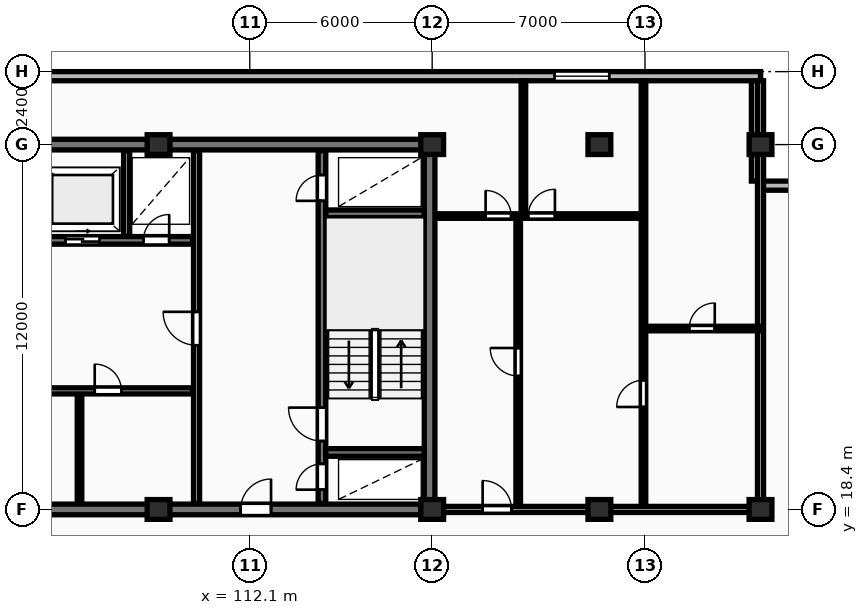
"""IFC4 building model, lengths in metres.
Left out: names, types, materials, properties, quantities, classifications, styles, units other than length and angle.
Written with IfcOpenShell. Run it as: python <this file> out.ifc"""

import sys

from ifc_helpers import new_model, si_unit, direction, frame, frame_2d, origin, origin_2d, place, context, subcontext, project, spatial, rectangle, extrude, element, fill, save


model = new_model("IFC4")
c1 = context("Model", 3, precision=1e-05, world=origin(), true_north=direction((0.0, 1.0)))
c2 = subcontext(c1, "Body", "Model", "MODEL_VIEW")
j1 = project(units=[si_unit("LENGTHUNIT", "METRE"), si_unit("PLANEANGLEUNIT", "RADIAN")], contexts=[c1])
p1 = place(None, origin())
s1 = spatial("IfcSite", under=j1, at=p1, CompositionType="ELEMENT")
p2 = place(p1, origin())
s2 = spatial("IfcBuilding", under=s1, at=p2, CompositionType="ELEMENT")
p3 = place(p2, frame((0.0, 0.0, 201.1)))
s3 = spatial("IfcBuildingStorey", under=s2, at=p3, CompositionType="ELEMENT", Elevation=201.1)
for number, where, z_axis, x_axis in (
    (1, (109.1, 18.4, 0.0), (0.0, 0.0, 1.0), (1.0, 0.0, 0.0)),
    (2, (109.1, 30.4, 0.0), (0.0, 0.0, 1.0), (1.0, 0.0, 0.0)),
    (3, (118.1, 18.4, 0.0), (0.0, 0.0, 1.0), (1.0, 0.0, 0.0)),
    (4, (118.1, 30.4, 0.0), (0.0, 0.0, 1.0), (1.0, 0.0, 0.0)),
    (5, (123.6, 18.4, 0.0), (0.0, 0.0, 1.0), (1.0, 0.0, 0.0)),
    (6, (123.6, 30.4, 0.0), (0.0, 0.0, 1.0), (1.0, 0.0, 0.0)),
    (7, (128.9, 18.4, 0.0), (0.0, 0.0, 1.0), (1.0, 0.0, 0.0)),
    (8, (128.9, 30.4, 0.0), (0.0, 0.0, 1.0), (1.0, 0.0, 0.0)),
):
    element("IfcColumn", number, at=place(p3, frame(where, z_axis=z_axis, x_axis=x_axis)), inside=s3, PredefinedType="COLUMN", context=c2, shape_type="SweptSolid", body=[
        extrude(rectangle(XDim=0.75, YDim=0.65, at=origin_2d()), origin(), (0.0, 0.0, 1.0), 3.25),
    ])
p4 = place(p3, frame((132.5, 29.05, 0.0), z_axis=(0.0, 0.0, 1.0), x_axis=(-1.0, 0.0, 0.0)))
e9 = element("IfcWall", 9, at=p4, inside=s3, PredefinedType="STANDARD", context=c2, shape_type="SweptSolid", body=[
    extrude(rectangle(XDim=3.6, YDim=0.3, at=frame_2d((1.8, 0.0))), origin(), (0.0, 0.0, 1.0), 2.97),
])
p5 = place(p3, frame((128.75, 29.2, 0.0), z_axis=(0.0, 0.0, 1.0), x_axis=(0.0, 1.0, 0.0)))
e10 = element("IfcWall", 10, at=p5, inside=s3, PredefinedType="STANDARD", context=c2, shape_type="SweptSolid", body=[
    extrude(rectangle(XDim=3.6, YDim=0.3, at=frame_2d((1.8, 0.0))), origin(), (0.0, 0.0, 1.0), 2.2),
])
p6 = place(p3, frame((128.9, 32.65, 0.0), z_axis=(0.0, 0.0, 1.0), x_axis=(-1.0, 0.0, 0.0)))
e11 = element("IfcWall", 11, at=p6, inside=s3, PredefinedType="STANDARD", context=c2, shape_type="SweptSolid", body=[
    extrude(rectangle(XDim=54.4, YDim=0.3, at=frame_2d((27.2, 0.0))), origin(), (0.0, 0.0, 1.0), 2.97),
])
p7 = place(p6, frame((48.65, 0.0, 0.85)))
e12 = element("IfcOpeningElement", 12, at=p7, cuts=e11, PredefinedType="OPENING", context=c2, shape_type="SweptSolid", body=[
    extrude(rectangle(XDim=1.8, YDim=1.8, at=frame_2d((0.9, 0.9))), frame((0.0, 0.16, 0.0), z_axis=(0.0, -1.0, 0.0), x_axis=(1.0, 0.0, 0.0)), (0.0, 0.0, 1.0), 0.32),
])
p8 = place(p6, frame((4.975, 0.0, 0.85)))
e13 = element("IfcOpeningElement", 13, at=p8, cuts=e11, PredefinedType="OPENING", context=c2, shape_type="SweptSolid", body=[
    extrude(rectangle(XDim=1.8, YDim=1.8, at=frame_2d((0.9, 0.9))), frame((0.0, 0.16, 0.0), z_axis=(0.0, -1.0, 0.0), x_axis=(1.0, 0.0, 0.0)), (0.0, 0.0, 1.0), 0.32),
])
p9 = place(p3, frame((81.925, 30.4, 0.0), z_axis=(0.0, 0.0, 1.0), x_axis=(1.0, 0.0, 0.0)))
e14 = element("IfcWall", 14, at=p9, inside=s3, PredefinedType="SHEAR", context=c2, shape_type="SweptSolid", body=[
    extrude(rectangle(XDim=36.265, YDim=0.35, at=frame_2d((18.132, 0.0))), origin(), (0.0, 0.0, 1.0), 3.25),
])
p10 = place(p3, frame((118.015, 18.575, 0.0), z_axis=(0.0, 0.0, 1.0), x_axis=(0.0, 1.0, 0.0)))
e15 = element("IfcWall", 15, at=p10, inside=s3, PredefinedType="SHEAR", context=c2, shape_type="SweptSolid", body=[
    extrude(rectangle(XDim=11.65, YDim=0.35, at=frame_2d((5.825, 0.0))), origin(), (0.0, 0.0, 1.0), 3.25),
])
p11 = place(p3, frame((81.925, 18.4, 0.0), z_axis=(0.0, 0.0, 1.0), x_axis=(1.0, 0.0, 0.0)))
e16 = element("IfcWall", 16, at=p11, inside=s3, PredefinedType="SHEAR", context=c2, shape_type="SweptSolid", body=[
    extrude(rectangle(XDim=36.265, YDim=0.35, at=frame_2d((18.132, 0.0))), origin(), (0.0, 0.0, 1.0), 3.25),
])
p12 = place(p11, frame((5.675, 0.0, 0.0)))
e17 = element("IfcOpeningElement", 17, at=p12, cuts=e16, PredefinedType="OPENING", context=c2, shape_type="SweptSolid", body=[
    extrude(rectangle(XDim=1.0, YDim=2.15, at=frame_2d((0.5, 1.075))), frame((0.0, 0.185, 0.0), z_axis=(0.0, -1.0, 0.0), x_axis=(1.0, 0.0, 0.0)), (0.0, 0.0, 1.0), 0.37),
])
p13 = place(p11, frame((21.925, 0.0, 0.0)))
e18 = element("IfcOpeningElement", 18, at=p13, cuts=e16, PredefinedType="OPENING", context=c2, shape_type="SweptSolid", body=[
    extrude(rectangle(XDim=1.5, YDim=2.2, at=frame_2d((0.75, 1.1))), frame((0.0, 0.185, 0.0), z_axis=(0.0, -1.0, 0.0), x_axis=(1.0, 0.0, 0.0)), (0.0, 0.0, 1.0), 0.37),
])
p14 = place(p11, frame((29.875, 0.0, 0.0)))
e19 = element("IfcOpeningElement", 19, at=p14, cuts=e16, PredefinedType="OPENING", context=c2, shape_type="SweptSolid", body=[
    extrude(rectangle(XDim=1.0, YDim=2.15, at=frame_2d((0.5, 1.075))), frame((0.0, 0.185, 0.0), z_axis=(0.0, -1.0, 0.0), x_axis=(1.0, 0.0, 0.0)), (0.0, 0.0, 1.0), 0.37),
])
p15 = place(p3, frame((108.05, 27.38, 0.0), z_axis=(0.0, 0.0, 1.0), x_axis=(0.0, 1.0, 0.0)))
e20 = element("IfcWall", 20, at=p15, inside=s3, PredefinedType="PARTITIONING", context=c2, shape_type="SweptSolid", body=[
    extrude(rectangle(XDim=2.82, YDim=0.2, at=frame_2d((1.41, 0.0))), origin(), (0.0, 0.0, 1.0), 2.97),
])
p16 = place(p3, frame((99.68, 27.25, 0.0), z_axis=(0.0, 0.0, 1.0), x_axis=(1.0, 0.0, 0.0)))
e21 = element("IfcWall", 21, at=p16, inside=s3, PredefinedType="SHEAR", context=c2, shape_type="SweptSolid", body=[
    extrude(rectangle(XDim=10.54, YDim=0.25, at=frame_2d((5.27, 0.0))), origin(), (0.0, 0.0, 1.0), 3.25),
])
p17 = place(p16, frame((0.76, 0.0, 0.0)))
e22 = element("IfcOpeningElement", 22, at=p17, cuts=e21, PredefinedType="OPENING", context=c2, shape_type="SweptSolid", body=[
    extrude(rectangle(XDim=1.12, YDim=2.12, at=frame_2d((0.56, 1.06))), frame((0.0, 0.135, 0.0), z_axis=(0.0, -1.0, 0.0), x_axis=(1.0, 0.0, 0.0)), (0.0, 0.0, 1.0), 0.27),
])
p18 = place(p16, frame((3.56, 0.0, 0.0)))
e23 = element("IfcOpeningElement", 23, at=p18, cuts=e21, PredefinedType="OPENING", context=c2, shape_type="SweptSolid", body=[
    extrude(rectangle(XDim=1.12, YDim=2.12, at=frame_2d((0.56, 1.06))), frame((0.0, 0.135, 0.0), z_axis=(0.0, -1.0, 0.0), x_axis=(1.0, 0.0, 0.0)), (0.0, 0.0, 1.0), 0.27),
])
p19 = place(p16, frame((6.36, 0.0, 0.0)))
e24 = element("IfcOpeningElement", 24, at=p19, cuts=e21, PredefinedType="OPENING", context=c2, shape_type="SweptSolid", body=[
    extrude(rectangle(XDim=1.12, YDim=2.12, at=frame_2d((0.56, 1.06))), frame((0.0, 0.135, 0.0), z_axis=(0.0, -1.0, 0.0), x_axis=(1.0, 0.0, 0.0)), (0.0, 0.0, 1.0), 0.27),
])
p20 = place(p16, frame((8.92, 0.0, 0.0)))
e25 = element("IfcOpeningElement", 25, at=p20, cuts=e21, PredefinedType="OPENING", context=c2, shape_type="SweptSolid", body=[
    extrude(rectangle(XDim=0.85, YDim=2.05, at=frame_2d((0.425, 1.025))), frame((0.0, 0.135, 0.0), z_axis=(0.0, -1.0, 0.0), x_axis=(1.0, 0.0, 0.0)), (0.0, 0.0, 1.0), 0.27),
])
p21 = place(p3, frame((106.5, 18.6, 0.0), z_axis=(0.0, 0.0, 1.0), x_axis=(0.0, 1.0, 0.0)))
e26 = element("IfcWall", 26, at=p21, inside=s3, PredefinedType="PARTITIONING", context=c2, shape_type="SweptSolid", body=[
    extrude(rectangle(XDim=3.6, YDim=0.15, at=frame_2d((1.8, 0.0))), origin(), (0.0, 0.0, 1.0), 2.97),
])
p22 = place(p3, frame((91.08, 22.3, 0.0), z_axis=(0.0, 0.0, 1.0), x_axis=(1.0, 0.0, 0.0)))
e27 = element("IfcWall", 27, at=p22, inside=s3, PredefinedType="PARTITIONING", context=c2, shape_type="SweptSolid", body=[
    extrude(rectangle(XDim=19.14, YDim=0.2, at=frame_2d((9.57, 0.0))), origin(), (0.0, 0.0, 1.0), 2.97),
])
p23 = place(p22, frame((1.15, 0.0, 0.0)))
e28 = element("IfcOpeningElement", 28, at=p23, cuts=e27, PredefinedType="OPENING", context=c2, shape_type="SweptSolid", body=[
    extrude(rectangle(XDim=0.85, YDim=2.05, at=frame_2d((0.425, 1.025))), frame((0.0, 0.11, 0.0), z_axis=(0.0, -1.0, 0.0), x_axis=(1.0, 0.0, 0.0)), (0.0, 0.0, 1.0), 0.22),
])
p24 = place(p22, frame((3.2, 0.0, 0.0)))
e29 = element("IfcOpeningElement", 29, at=p24, cuts=e27, PredefinedType="OPENING", context=c2, shape_type="SweptSolid", body=[
    extrude(rectangle(XDim=0.85, YDim=2.05, at=frame_2d((0.425, 1.025))), frame((0.0, 0.11, 0.0), z_axis=(0.0, -1.0, 0.0), x_axis=(1.0, 0.0, 0.0)), (0.0, 0.0, 1.0), 0.22),
])
p25 = place(p22, frame((12.72, 0.0, 0.0)))
e30 = element("IfcOpeningElement", 30, at=p25, cuts=e27, PredefinedType="OPENING", context=c2, shape_type="SweptSolid", body=[
    extrude(rectangle(XDim=1.5, YDim=2.2, at=frame_2d((0.75, 1.1))), frame((0.0, 0.11, 0.0), z_axis=(0.0, -1.0, 0.0), x_axis=(1.0, 0.0, 0.0)), (0.0, 0.0, 1.0), 0.22),
])
p26 = place(p22, frame((6.42, 0.0, 0.0)))
e31 = element("IfcOpeningElement", 31, at=p26, cuts=e27, PredefinedType="OPENING", context=c2, shape_type="SweptSolid", body=[
    extrude(rectangle(XDim=0.92, YDim=2.08, at=frame_2d((0.46, 1.04))), frame((0.0, 0.11, 0.0), z_axis=(0.0, -1.0, 0.0), x_axis=(1.0, 0.0, 0.0)), (0.0, 0.0, 1.0), 0.22),
])
p27 = place(p22, frame((15.92, 0.0, 0.0)))
e32 = element("IfcOpeningElement", 32, at=p27, cuts=e27, PredefinedType="OPENING", context=c2, shape_type="SweptSolid", body=[
    extrude(rectangle(XDim=0.88, YDim=2.06, at=frame_2d((0.44, 1.03))), frame((0.0, 0.11, 0.0), z_axis=(0.0, -1.0, 0.0), x_axis=(1.0, 0.0, 0.0)), (0.0, 0.0, 1.0), 0.22),
])
p28 = place(p3, frame((110.35, 18.6, 0.0), z_axis=(0.0, 0.0, 1.0), x_axis=(0.0, 1.0, 0.0)))
e33 = element("IfcWall", 33, at=p28, inside=s3, PredefinedType="PARTITIONING", context=c2, shape_type="SweptSolid", body=[
    extrude(rectangle(XDim=11.6, YDim=0.2, at=frame_2d((5.8, 0.0))), origin(), (0.0, 0.0, 1.0), 2.97),
])
p29 = place(p28, frame((5.2, 0.0, 0.0)))
e34 = element("IfcOpeningElement", 34, at=p29, cuts=e33, PredefinedType="OPENING", context=c2, shape_type="SweptSolid", body=[
    extrude(rectangle(XDim=1.1, YDim=2.15, at=frame_2d((0.55, 1.075))), frame((0.0, 0.11, 0.0), z_axis=(0.0, -1.0, 0.0), x_axis=(1.0, 0.0, 0.0)), (0.0, 0.0, 1.0), 0.22),
])
p30 = place(p3, frame((114.475, 18.6, 0.0), z_axis=(0.0, 0.0, 1.0), x_axis=(0.0, 1.0, 0.0)))
e35 = element("IfcWall", 35, at=p30, inside=s3, PredefinedType="SHEAR", context=c2, shape_type="SweptSolid", body=[
    extrude(rectangle(XDim=11.6, YDim=0.25, at=frame_2d((5.8, 0.0))), origin(), (0.0, 0.0, 1.0), 3.25),
])
p31 = place(p30, frame((0.45, 0.0, 0.0)))
e36 = element("IfcOpeningElement", 36, at=p31, cuts=e35, PredefinedType="OPENING", context=c2, shape_type="SweptSolid", body=[
    extrude(rectangle(XDim=0.85, YDim=2.05, at=frame_2d((0.425, 1.025))), frame((0.0, 0.135, 0.0), z_axis=(0.0, -1.0, 0.0), x_axis=(1.0, 0.0, 0.0)), (0.0, 0.0, 1.0), 0.27),
])
p32 = place(p30, frame((2.05, 0.0, 0.0)))
e37 = element("IfcOpeningElement", 37, at=p32, cuts=e35, PredefinedType="OPENING", context=c2, shape_type="SweptSolid", body=[
    extrude(rectangle(XDim=1.1, YDim=2.1, at=frame_2d((0.55, 1.05))), frame((0.0, 0.135, 0.0), z_axis=(0.0, -1.0, 0.0), x_axis=(1.0, 0.0, 0.0)), (0.0, 0.0, 1.0), 0.27),
])
p33 = place(p30, frame((9.95, 0.0, 0.0)))
e38 = element("IfcOpeningElement", 38, at=p33, cuts=e35, PredefinedType="OPENING", context=c2, shape_type="SweptSolid", body=[
    extrude(rectangle(XDim=0.85, YDim=2.05, at=frame_2d((0.425, 1.025))), frame((0.0, 0.135, 0.0), z_axis=(0.0, -1.0, 0.0), x_axis=(1.0, 0.0, 0.0)), (0.0, 0.0, 1.0), 0.27),
])
for number, where, z_axis, x_axis in (
    (39, (114.6, 20.275, 0.0), (0.0, 0.0, 1.0), (1.0, 0.0, 0.0)),
    (40, (114.6, 28.125, 0.0), (0.0, 0.0, 1.0), (1.0, 0.0, 0.0)),
):
    element("IfcWall", number, at=place(p3, frame(where, z_axis=z_axis, x_axis=x_axis)), inside=s3, PredefinedType="SHEAR", context=c2, shape_type="SweptSolid", body=[
        extrude(rectangle(XDim=3.24, YDim=0.25, at=frame_2d((1.62, 0.0))), origin(), (0.0, 0.0, 1.0), 3.25),
    ])
p34 = place(p3, frame((128.9, 18.4, 0.0), z_axis=(0.0, 0.0, 1.0), x_axis=(0.0, 1.0, 0.0)))
e41 = element("IfcWall", 41, at=p34, inside=s3, PredefinedType="PARTITIONING", context=c2, shape_type="SweptSolid", body=[
    extrude(rectangle(XDim=14.1, YDim=0.2, at=frame_2d((7.05, 0.0))), origin(), (0.0, 0.0, 1.0), 2.2),
])
p35 = place(p3, frame((125.05, 24.35, 0.0), z_axis=(0.0, 0.0, 1.0), x_axis=(1.0, 0.0, 0.0)))
e42 = element("IfcWall", 42, at=p35, inside=s3, PredefinedType="PARTITIONING", context=c2, shape_type="SweptSolid", body=[
    extrude(rectangle(XDim=3.85, YDim=0.15, at=frame_2d((1.925, 0.0))), origin(), (0.0, 0.0, 1.0), 2.97),
])
p36 = place(p35, frame((1.505, 0.0, 0.0)))
e43 = element("IfcOpeningElement", 43, at=p36, cuts=e42, PredefinedType="OPENING", context=c2, shape_type="SweptSolid", body=[
    extrude(rectangle(XDim=0.84, YDim=2.04, at=frame_2d((0.42, 1.02))), frame((0.0, 0.085, 0.0), z_axis=(0.0, -1.0, 0.0), x_axis=(1.0, 0.0, 0.0)), (0.0, 0.0, 1.0), 0.17),
])
p37 = place(p3, frame((125.05, 18.45, 0.0), z_axis=(0.0, 0.0, 1.0), x_axis=(0.0, 1.0, 0.0)))
e44 = element("IfcWall", 44, at=p37, inside=s3, PredefinedType="PARTITIONING", context=c2, shape_type="SweptSolid", body=[
    extrude(rectangle(XDim=14.05, YDim=0.15, at=frame_2d((7.025, 0.0))), origin(), (0.0, 0.0, 1.0), 2.97),
])
p38 = place(p37, frame((3.32, 0.0, 0.0)))
e45 = element("IfcOpeningElement", 45, at=p38, cuts=e44, PredefinedType="OPENING", context=c2, shape_type="SweptSolid", body=[
    extrude(rectangle(XDim=0.88, YDim=2.06, at=frame_2d((0.44, 1.03))), frame((0.0, 0.085, 0.0), z_axis=(0.0, -1.0, 0.0), x_axis=(1.0, 0.0, 0.0)), (0.0, 0.0, 1.0), 0.17),
])
p39 = place(p3, frame((120.93, 18.45, 0.0), z_axis=(0.0, 0.0, 1.0), x_axis=(0.0, 1.0, 0.0)))
e46 = element("IfcWall", 46, at=p39, inside=s3, PredefinedType="PARTITIONING", context=c2, shape_type="SweptSolid", body=[
    extrude(rectangle(XDim=9.6, YDim=0.15, at=frame_2d((4.8, 0.0))), origin(), (0.0, 0.0, 1.0), 2.97),
])
p40 = place(p39, frame((4.34, 0.0, 0.0)))
e47 = element("IfcOpeningElement", 47, at=p40, cuts=e46, PredefinedType="OPENING", context=c2, shape_type="SweptSolid", body=[
    extrude(rectangle(XDim=0.92, YDim=2.08, at=frame_2d((0.46, 1.04))), frame((0.0, 0.085, 0.0), z_axis=(0.0, -1.0, 0.0), x_axis=(1.0, 0.0, 0.0)), (0.0, 0.0, 1.0), 0.17),
])
p41 = place(p3, frame((121.1, 28.05, 0.0), z_axis=(0.0, 0.0, 1.0), x_axis=(0.0, 1.0, 0.0)))
e48 = element("IfcWall", 48, at=p41, inside=s3, PredefinedType="PARTITIONING", context=c2, shape_type="SweptSolid", body=[
    extrude(rectangle(XDim=4.45, YDim=0.15, at=frame_2d((2.225, 0.0))), origin(), (0.0, 0.0, 1.0), 2.97),
])
p42 = place(p3, frame((118.27, 28.05, 0.0), z_axis=(0.0, 0.0, 1.0), x_axis=(1.0, 0.0, 0.0)))
e49 = element("IfcWall", 49, at=p42, inside=s3, PredefinedType="PARTITIONING", context=c2, shape_type="SweptSolid", body=[
    extrude(rectangle(XDim=6.76, YDim=0.15, at=frame_2d((3.38, 0.0))), origin(), (0.0, 0.0, 1.0), 2.97),
])
p43 = place(p42, frame((1.587, 0.0, 0.0)))
e50 = element("IfcOpeningElement", 50, at=p43, cuts=e49, PredefinedType="OPENING", context=c2, shape_type="SweptSolid", body=[
    extrude(rectangle(XDim=0.84, YDim=2.04, at=frame_2d((0.42, 1.02))), frame((0.0, 0.085, 0.0), z_axis=(0.0, -1.0, 0.0), x_axis=(1.0, 0.0, 0.0)), (0.0, 0.0, 1.0), 0.17),
])
p44 = place(p42, frame((2.988, 0.0, 0.0)))
e51 = element("IfcOpeningElement", 51, at=p44, cuts=e49, PredefinedType="OPENING", context=c2, shape_type="SweptSolid", body=[
    extrude(rectangle(XDim=0.88, YDim=2.06, at=frame_2d((0.44, 1.03))), frame((0.0, 0.085, 0.0), z_axis=(0.0, -1.0, 0.0), x_axis=(1.0, 0.0, 0.0)), (0.0, 0.0, 1.0), 0.17),
])
p45 = place(p3, frame((118.25, 18.4, 0.0), z_axis=(0.0, 0.0, 1.0), x_axis=(1.0, 0.0, 0.0)))
e52 = element("IfcWall", 52, at=p45, inside=s3, PredefinedType="PARTITIONING", context=c2, shape_type="SweptSolid", body=[
    extrude(rectangle(XDim=10.65, YDim=0.2, at=frame_2d((5.325, 0.0))), origin(), (0.0, 0.0, 1.0), 2.358),
])
p46 = place(p45, frame((1.51, 0.0, 0.0)))
e53 = element("IfcOpeningElement", 53, at=p46, cuts=e52, PredefinedType="OPENING", context=c2, shape_type="SweptSolid", body=[
    extrude(rectangle(XDim=0.95, YDim=2.15, at=frame_2d((0.475, 1.075))), frame((0.0, 0.11, 0.0), z_axis=(0.0, -1.0, 0.0), x_axis=(1.0, 0.0, 0.0)), (0.0, 0.0, 1.0), 0.22),
])
p47 = place(p8, origin())
e54 = element("IfcWindow", 54, at=p47, inside=s3, PartitioningType="SINGLE_PANEL", PredefinedType="WINDOW", context=c2, shape_type="SweptSolid", body=[
    extrude(rectangle(XDim=1.8, YDim=1.8, at=frame_2d((0.9, 0.9))), frame((0.0, 0.03, 0.0), z_axis=(0.0, -1.0, 0.0), x_axis=(1.0, 0.0, 0.0)), (0.0, 0.0, 1.0), 0.06),
])
fill(e13, e54)
p48 = place(p14, origin())
e55 = element("IfcDoor", 55, at=p48, inside=s3, OperationType="SINGLE_SWING_RIGHT", PredefinedType="DOOR", context=c2, shape_type="SweptSolid", body=[
    extrude(rectangle(XDim=1.0, YDim=2.15, at=frame_2d((0.5, 1.075))), frame((0.0, 0.025, 0.0), z_axis=(0.0, -1.0, 0.0), x_axis=(1.0, 0.0, 0.0)), (0.0, 0.0, 1.0), 0.05),
])
fill(e19, e55)
p49 = place(p19, origin())
e56 = element("IfcDoor", 56, at=p49, inside=s3, OperationType="SLIDING_TO_RIGHT", PredefinedType="DOOR", context=c2, shape_type="SweptSolid", body=[
    extrude(rectangle(XDim=1.12, YDim=2.12, at=frame_2d((0.56, 1.06))), frame((0.0, 0.025, 0.0), z_axis=(0.0, -1.0, 0.0), x_axis=(1.0, 0.0, 0.0)), (0.0, 0.0, 1.0), 0.05),
])
fill(e24, e56)
p50 = place(p20, origin())
e57 = element("IfcDoor", 57, at=p50, inside=s3, OperationType="SINGLE_SWING_RIGHT", PredefinedType="DOOR", context=c2, shape_type="SweptSolid", body=[
    extrude(rectangle(XDim=0.85, YDim=2.05, at=frame_2d((0.425, 1.025))), frame((0.0, 0.025, 0.0), z_axis=(0.0, -1.0, 0.0), x_axis=(1.0, 0.0, 0.0)), (0.0, 0.0, 1.0), 0.05),
])
fill(e25, e57)
p51 = place(p27, origin())
e58 = element("IfcDoor", 58, at=p51, inside=s3, OperationType="SINGLE_SWING_LEFT", PredefinedType="DOOR", context=c2, shape_type="SweptSolid", body=[
    extrude(rectangle(XDim=0.88, YDim=2.06, at=frame_2d((0.44, 1.03))), frame((0.0, 0.025, 0.0), z_axis=(0.0, -1.0, 0.0), x_axis=(1.0, 0.0, 0.0)), (0.0, 0.0, 1.0), 0.05),
])
fill(e32, e58)
p52 = place(p29, origin())
e59 = element("IfcDoor", 59, at=p52, inside=s3, OperationType="SINGLE_SWING_RIGHT", PredefinedType="DOOR", context=c2, shape_type="SweptSolid", body=[
    extrude(rectangle(XDim=1.1, YDim=2.15, at=frame_2d((0.55, 1.075))), frame((0.0, 0.025, 0.0), z_axis=(0.0, -1.0, 0.0), x_axis=(1.0, 0.0, 0.0)), (0.0, 0.0, 1.0), 0.05),
])
fill(e34, e59)
p53 = place(p31, origin())
e60 = element("IfcDoor", 60, at=p53, inside=s3, OperationType="SINGLE_SWING_LEFT", PredefinedType="DOOR", context=c2, shape_type="SweptSolid", body=[
    extrude(rectangle(XDim=0.85, YDim=2.05, at=frame_2d((0.425, 1.025))), frame((0.0, 0.025, 0.0), z_axis=(0.0, -1.0, 0.0), x_axis=(1.0, 0.0, 0.0)), (0.0, 0.0, 1.0), 0.05),
])
fill(e36, e60)
p54 = place(p32, origin())
e61 = element("IfcDoor", 61, at=p54, inside=s3, OperationType="SINGLE_SWING_RIGHT", PredefinedType="DOOR", context=c2, shape_type="SweptSolid", body=[
    extrude(rectangle(XDim=1.1, YDim=2.1, at=frame_2d((0.55, 1.05))), frame((0.0, 0.025, 0.0), z_axis=(0.0, -1.0, 0.0), x_axis=(1.0, 0.0, 0.0)), (0.0, 0.0, 1.0), 0.05),
])
fill(e37, e61)
p55 = place(p33, origin())
e62 = element("IfcDoor", 62, at=p55, inside=s3, OperationType="SINGLE_SWING_LEFT", PredefinedType="DOOR", context=c2, shape_type="SweptSolid", body=[
    extrude(rectangle(XDim=0.85, YDim=2.05, at=frame_2d((0.425, 1.025))), frame((0.0, 0.025, 0.0), z_axis=(0.0, -1.0, 0.0), x_axis=(1.0, 0.0, 0.0)), (0.0, 0.0, 1.0), 0.05),
])
fill(e38, e62)
p56 = place(p36, origin())
e63 = element("IfcDoor", 63, at=p56, inside=s3, OperationType="SINGLE_SWING_RIGHT", PredefinedType="DOOR", context=c2, shape_type="SweptSolid", body=[
    extrude(rectangle(XDim=0.84, YDim=2.04, at=frame_2d((0.42, 1.02))), frame((0.0, 0.025, 0.0), z_axis=(0.0, -1.0, 0.0), x_axis=(1.0, 0.0, 0.0)), (0.0, 0.0, 1.0), 0.05),
])
fill(e43, e63)
p57 = place(p38, origin())
e64 = element("IfcDoor", 64, at=p57, inside=s3, OperationType="SINGLE_SWING_LEFT", PredefinedType="DOOR", context=c2, shape_type="SweptSolid", body=[
    extrude(rectangle(XDim=0.88, YDim=2.06, at=frame_2d((0.44, 1.03))), frame((0.0, 0.025, 0.0), z_axis=(0.0, -1.0, 0.0), x_axis=(1.0, 0.0, 0.0)), (0.0, 0.0, 1.0), 0.05),
])
fill(e45, e64)
p58 = place(p40, origin())
e65 = element("IfcDoor", 65, at=p58, inside=s3, OperationType="SINGLE_SWING_RIGHT", PredefinedType="DOOR", context=c2, shape_type="SweptSolid", body=[
    extrude(rectangle(XDim=0.92, YDim=2.08, at=frame_2d((0.46, 1.04))), frame((0.0, 0.025, 0.0), z_axis=(0.0, -1.0, 0.0), x_axis=(1.0, 0.0, 0.0)), (0.0, 0.0, 1.0), 0.05),
])
fill(e47, e65)
p59 = place(p43, origin())
e66 = element("IfcDoor", 66, at=p59, inside=s3, OperationType="SINGLE_SWING_LEFT", PredefinedType="DOOR", context=c2, shape_type="SweptSolid", body=[
    extrude(rectangle(XDim=0.84, YDim=2.04, at=frame_2d((0.42, 1.02))), frame((0.0, 0.025, 0.0), z_axis=(0.0, -1.0, 0.0), x_axis=(1.0, 0.0, 0.0)), (0.0, 0.0, 1.0), 0.05),
])
fill(e50, e66)
p60 = place(p44, origin())
e67 = element("IfcDoor", 67, at=p60, inside=s3, OperationType="SINGLE_SWING_RIGHT", PredefinedType="DOOR", context=c2, shape_type="SweptSolid", body=[
    extrude(rectangle(XDim=0.88, YDim=2.06, at=frame_2d((0.44, 1.03))), frame((0.0, 0.025, 0.0), z_axis=(0.0, -1.0, 0.0), x_axis=(1.0, 0.0, 0.0)), (0.0, 0.0, 1.0), 0.05),
])
fill(e51, e67)
p61 = place(p46, origin())
e68 = element("IfcDoor", 68, at=p61, inside=s3, OperationType="SINGLE_SWING_LEFT", PredefinedType="DOOR", context=c2, shape_type="SweptSolid", body=[
    extrude(rectangle(XDim=0.95, YDim=2.15, at=frame_2d((0.475, 1.075))), frame((0.0, 0.025, 0.0), z_axis=(0.0, -1.0, 0.0), x_axis=(1.0, 0.0, 0.0)), (0.0, 0.0, 1.0), 0.05),
])
fill(e53, e68)
save(model, sys.argv[1])
